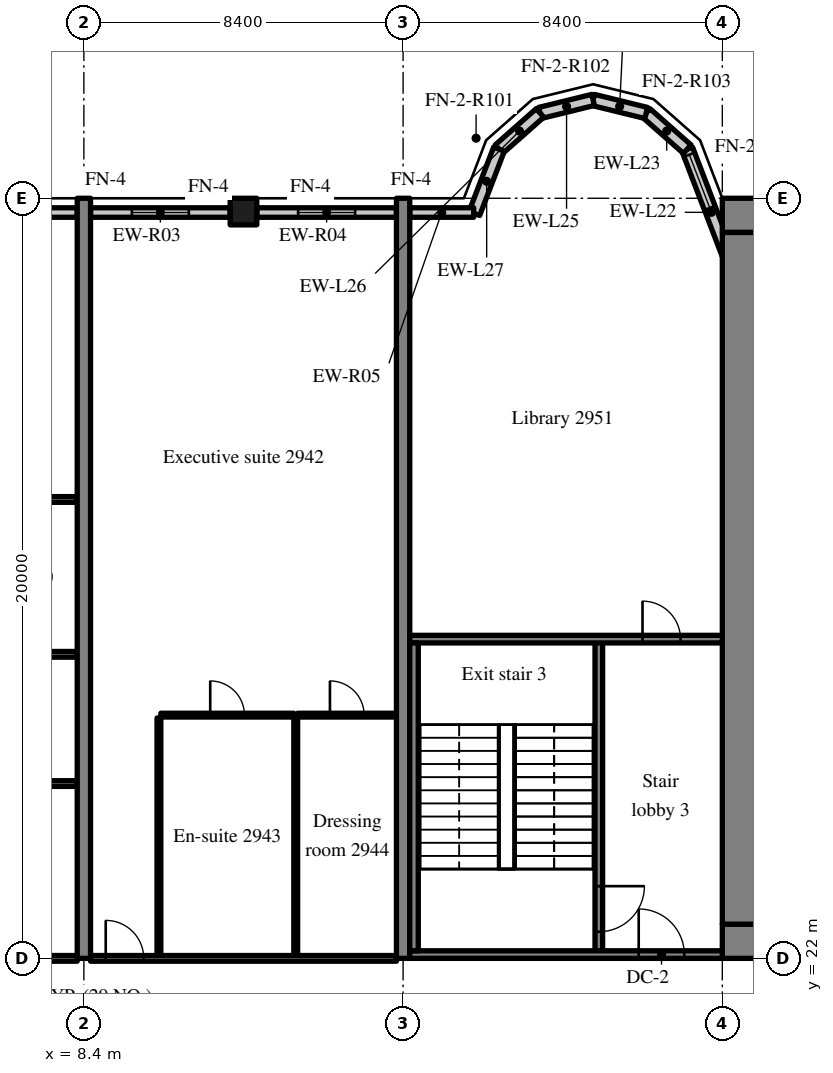
"""IFC4 building model, lengths in metres.
Left out: names, types, materials, properties, quantities, classifications, styles, units other than length and angle.
Written with IfcOpenShell. Run it as: python <this file> out.ifc"""

import sys

from ifc_helpers import new_model, si_unit, direction, frame, frame_2d, origin, origin_2d, place, context, subcontext, project, spatial, rectangle, extrude, source, transform, mapped, element, fill, save


model = new_model("IFC4")
c1 = context("Model", 3, precision=1e-05, world=origin(), true_north=direction((0.0, 1.0)))
c2 = subcontext(c1, "Body", "Model", "MODEL_VIEW")
j1 = project(units=[si_unit("LENGTHUNIT", "METRE"), si_unit("PLANEANGLEUNIT", "RADIAN")], contexts=[c1])
p1 = place(None, origin())
s1 = spatial("IfcSite", under=j1, at=p1, CompositionType="ELEMENT")
p2 = place(p1, origin())
s2 = spatial("IfcBuilding", under=s1, at=p2, CompositionType="ELEMENT")
p3 = place(p2, frame((0.0, 0.0, 121.8)))
s3 = spatial("IfcBuildingStorey", under=s2, at=p3, CompositionType="ELEMENT", Elevation=121.8)
m1 = source(origin(), c2, "Body", "SweptSolid", [
    extrude(rectangle(XDim=50.4, YDim=0.9, at=frame_2d((25.2, 0.0))), origin(), (0.0, 0.0, 1.0), 3.52),
])
p4 = place(p3, frame((25.2, 22.45, 0.0), z_axis=(0.0, 0.0, 1.0), x_axis=(1.0, 0.0, 0.0)))
e1 = element("IfcWall", 1, at=p4, inside=s3, PredefinedType="SHEAR", context=c2, shape_type="MappedRepresentation", body=[
    mapped(m1, transform((0.0, 0.0, 0.0), scale=1.0)),
])
m2 = source(origin(), c2, "Body", "SweptSolid", [
    extrude(rectangle(XDim=1.8, YDim=2.1, at=frame_2d((0.9, 1.05))), frame((0.0, 0.46, 0.0), z_axis=(0.0, -1.0, 0.0), x_axis=(1.0, 0.0, 0.0)), (0.0, 0.0, 1.0), 0.92),
])
p5 = place(p4, frame((15.9, 0.0, 0.0)))
e2 = element("IfcOpeningElement", 2, at=p5, cuts=e1, PredefinedType="OPENING", context=c2, shape_type="MappedRepresentation", body=[
    mapped(m2, transform((0.0, 0.0, 0.0), scale=1.0)),
])
m3 = source(origin(), c2, "Body", "SweptSolid", [
    extrude(rectangle(XDim=1.2, YDim=2.1, at=frame_2d((0.6, 1.05))), frame((0.0, 0.46, 0.0), z_axis=(0.0, -1.0, 0.0), x_axis=(1.0, 0.0, 0.0)), (0.0, 0.0, 1.0), 0.92),
])
p6 = place(p4, frame((26.975, 0.0, 0.0)))
e3 = element("IfcOpeningElement", 3, at=p6, cuts=e1, PredefinedType="OPENING", context=c2, shape_type="MappedRepresentation", body=[
    mapped(m3, transform((0.0, 0.0, 0.0), scale=1.0)),
])
m4 = source(origin(), c2, "Body", "SweptSolid", [
    extrude(rectangle(XDim=0.9, YDim=2.1, at=frame_2d((0.45, 1.05))), frame((0.0, 0.46, 0.0), z_axis=(0.0, -1.0, 0.0), x_axis=(1.0, 0.0, 0.0)), (0.0, 0.0, 1.0), 0.92),
])
p7 = place(p4, frame((33.75, 0.0, 0.0)))
e4 = element("IfcOpeningElement", 4, at=p7, cuts=e1, PredefinedType="OPENING", context=c2, shape_type="MappedRepresentation", body=[
    mapped(m4, transform((0.0, 0.0, 0.0), scale=1.0)),
])
p8 = place(p4, frame((30.75, 0.0, 0.0)))
e5 = element("IfcOpeningElement", 5, at=p8, cuts=e1, PredefinedType="OPENING", context=c2, shape_type="MappedRepresentation", body=[
    mapped(m4, transform((0.0, 0.0, 0.0), scale=1.0)),
])
p9 = place(p4, frame((38.275, 0.0, 0.0)))
e6 = element("IfcOpeningElement", 6, at=p9, cuts=e1, PredefinedType="OPENING", context=c2, shape_type="MappedRepresentation", body=[
    mapped(m4, transform((0.0, 0.0, 0.0), scale=1.0)),
])
p10 = place(p4, frame((6.45, 0.0, 0.0)))
e7 = element("IfcOpeningElement", 7, at=p10, cuts=e1, PredefinedType="OPENING", context=c2, shape_type="MappedRepresentation", body=[
    mapped(m3, transform((0.0, 0.0, 0.0), scale=1.0)),
])
p11 = place(p4, frame((47.775, 0.0, 0.0)))
e8 = element("IfcOpeningElement", 8, at=p11, cuts=e1, PredefinedType="OPENING", context=c2, shape_type="MappedRepresentation", body=[
    mapped(m3, transform((0.0, 0.0, 0.0), scale=1.0)),
])
p12 = place(p3, frame((25.2, 41.55, 0.0), z_axis=(0.0, 0.0, 1.0), x_axis=(1.0, 0.0, 0.0)))
e9 = element("IfcWall", 9, at=p12, inside=s3, PredefinedType="SHEAR", context=c2, shape_type="MappedRepresentation", body=[
    mapped(m1, transform((0.0, 0.0, 0.0), scale=1.0)),
])
m5 = source(origin(), c2, "Body", "SweptSolid", [
    extrude(rectangle(XDim=18.2, YDim=0.9, at=frame_2d((9.1, 0.0))), origin(), (0.0, 0.0, 1.0), 3.52),
])
p13 = place(p3, frame((25.65, 22.9, 0.0), z_axis=(0.0, 0.0, 1.0), x_axis=(0.0, 1.0, 0.0)))
e10 = element("IfcWall", 10, at=p13, inside=s3, PredefinedType="SHEAR", context=c2, shape_type="MappedRepresentation", body=[
    mapped(m5, transform((0.0, 0.0, 0.0), scale=1.0)),
])
m6 = source(origin(), c2, "Body", "SweptSolid", [
    extrude(rectangle(XDim=20.0, YDim=0.35, at=frame_2d((10.0, 0.0))), origin(), (0.0, 0.0, 1.0), 3.52),
])
for number, where, z_axis, x_axis in (
    (11, (8.4, 22.0, 0.0), (0.0, 0.0, 1.0), (0.0, 1.0, 0.0)),
    (12, (16.8, 22.0, 0.0), (0.0, 0.0, 1.0), (0.0, 1.0, 0.0)),
):
    element("IfcWall", number, at=place(p3, frame(where, z_axis=z_axis, x_axis=x_axis)), inside=s3, PredefinedType="SHEAR", context=c2, shape_type="MappedRepresentation", body=[
        mapped(m6, transform((0.0, 0.0, 0.0), scale=1.0)),
    ])
m7 = source(origin(), c2, "Body", "SweptSolid", [
    extrude(rectangle(XDim=0.7, YDim=0.7, at=origin_2d()), origin(), (0.0, 0.0, 1.0), 3.52),
])
p14 = place(p3, frame((12.6, 41.65, 0.0), z_axis=(0.0, 0.0, 1.0), x_axis=(1.0, 0.0, 0.0)))
e13 = element("IfcColumn", 13, at=p14, inside=s3, PredefinedType="COLUMN", context=c2, shape_type="MappedRepresentation", body=[
    mapped(m7, transform((0.0, 0.0, 0.0), scale=1.0)),
])
m8 = source(origin(), c2, "Body", "SweptSolid", [
    extrude(rectangle(XDim=3.559, YDim=0.3, at=frame_2d((1.78, 0.0))), origin(), (0.0, 0.0, 1.0), 3.52),
])
p15 = place(p3, frame((25.55, 39.969, 0.0), z_axis=(0.0, 0.0, 1.0), x_axis=(-0.35779745313, 0.933799219604, 0.0)))
e14 = element("IfcWall", 14, at=p15, inside=s3, PredefinedType="SOLIDWALL", context=c2, shape_type="MappedRepresentation", body=[
    mapped(m8, transform((0.0, 0.0, 0.0), scale=1.0)),
])
m9 = source(origin(), c2, "Body", "SweptSolid", [
    extrude(rectangle(XDim=1.5, YDim=2.0, at=frame_2d((0.75, 1.0))), frame((0.0, 0.16, 0.0), z_axis=(0.0, -1.0, 0.0), x_axis=(1.0, 0.0, 0.0)), (0.0, 0.0, 1.0), 0.32),
])
p16 = place(p15, frame((1.903, 0.0, 0.9)))
e15 = element("IfcOpeningElement", 15, at=p16, cuts=e14, PredefinedType="OPENING", context=c2, shape_type="MappedRepresentation", body=[
    mapped(m9, transform((0.0, 0.0, 0.0), scale=1.0)),
])
m10 = source(origin(), c2, "Body", "SweptSolid", [
    extrude(rectangle(XDim=1.44, YDim=0.3, at=frame_2d((0.72, 0.0))), origin(), (0.0, 0.0, 1.0), 3.52),
])
p17 = place(p3, frame((24.277, 43.292, 0.0), z_axis=(0.0, 0.0, 1.0), x_axis=(-0.749649827867, 0.661834673902, 0.0)))
e16 = element("IfcWall", 16, at=p17, inside=s3, PredefinedType="SOLIDWALL", context=c2, shape_type="MappedRepresentation", body=[
    mapped(m10, transform((0.0, 0.0, 0.0), scale=1.0)),
])
m11 = source(origin(), c2, "Body", "SweptSolid", [
    extrude(rectangle(XDim=1.438, YDim=0.3, at=frame_2d((0.719, 0.0))), origin(), (0.0, 0.0, 1.0), 3.52),
])
p18 = place(p3, frame((23.197, 44.245, 0.0), z_axis=(0.0, 0.0, 1.0), x_axis=(-0.971152283879, 0.238460146601, 0.0)))
e17 = element("IfcWall", 17, at=p18, inside=s3, PredefinedType="SOLIDWALL", context=c2, shape_type="MappedRepresentation", body=[
    mapped(m11, transform((0.0, 0.0, 0.0), scale=1.0)),
])
m12 = source(origin(), c2, "Body", "SweptSolid", [
    extrude(rectangle(XDim=1.439, YDim=0.3, at=frame_2d((0.719, 0.0))), origin(), (0.0, 0.0, 1.0), 3.52),
])
p19 = place(p3, frame((21.8, 44.588, 0.0), z_axis=(0.0, 0.0, 1.0), x_axis=(-0.971161932466, -0.238420848351, 0.0)))
e18 = element("IfcWall", 18, at=p19, inside=s3, PredefinedType="SOLIDWALL", context=c2, shape_type="MappedRepresentation", body=[
    mapped(m12, transform((0.0, 0.0, 0.0), scale=1.0)),
])
m13 = source(origin(), c2, "Body", "SweptSolid", [
    extrude(rectangle(XDim=1.44, YDim=0.3, at=frame_2d((0.72, 0.0))), origin(), (0.0, 0.0, 1.0), 3.52),
])
p20 = place(p3, frame((20.403, 44.245, 0.0), z_axis=(0.0, 0.0, 1.0), x_axis=(-0.74957555648, -0.661918790432, 0.0)))
e19 = element("IfcWall", 19, at=p20, inside=s3, PredefinedType="SOLIDWALL", context=c2, shape_type="MappedRepresentation", body=[
    mapped(m13, transform((0.0, 0.0, 0.0), scale=1.0)),
])
m14 = source(origin(), c2, "Body", "SweptSolid", [
    extrude(rectangle(XDim=1.812, YDim=0.3, at=frame_2d((0.906, 0.0))), origin(), (0.0, 0.0, 1.0), 3.52),
])
p21 = place(p3, frame((19.323, 43.292, 0.0), z_axis=(0.0, 0.0, 1.0), x_axis=(-0.357877270961, -0.93376863244, 0.0)))
e20 = element("IfcWall", 20, at=p21, inside=s3, PredefinedType="SOLIDWALL", context=c2, shape_type="MappedRepresentation", body=[
    mapped(m14, transform((0.0, 0.0, 0.0), scale=1.0)),
])
m15 = source(origin(), c2, "Body", "SweptSolid", [
    extrude(rectangle(XDim=4.07, YDim=0.25, at=frame_2d((2.035, 0.0))), origin(), (0.0, 0.0, 1.0), 2.82),
])
p22 = place(p3, frame((8.225, 41.625, 0.0), z_axis=(0.0, 0.0, 1.0), x_axis=(-1.0, 0.0, 0.0)))
e21 = element("IfcWall", 21, at=p22, inside=s3, PredefinedType="SOLIDWALL", context=c2, shape_type="MappedRepresentation", body=[
    mapped(m15, transform((0.0, 0.0, 0.0), scale=1.0)),
])
m16 = source(origin(), c2, "Body", "SweptSolid", [
    extrude(rectangle(XDim=1.5, YDim=1.5, at=frame_2d((0.75, 0.75))), frame((0.0, 0.135, 0.0), z_axis=(0.0, -1.0, 0.0), x_axis=(1.0, 0.0, 0.0)), (0.0, 0.0, 1.0), 0.27),
])
p23 = place(p22, frame((1.285, 0.0, 0.9)))
e22 = element("IfcOpeningElement", 22, at=p23, cuts=e21, PredefinedType="OPENING", context=c2, shape_type="MappedRepresentation", body=[
    mapped(m16, transform((0.0, 0.0, 0.0), scale=1.0)),
])
m17 = source(origin(), c2, "Body", "SweptSolid", [
    extrude(rectangle(XDim=3.675, YDim=0.25, at=frame_2d((1.837, 0.0))), origin(), (0.0, 0.0, 1.0), 2.82),
])
p24 = place(p3, frame((12.25, 41.625, 0.0), z_axis=(0.0, 0.0, 1.0), x_axis=(-1.0, 0.0, 0.0)))
e23 = element("IfcWall", 23, at=p24, inside=s3, PredefinedType="SOLIDWALL", context=c2, shape_type="MappedRepresentation", body=[
    mapped(m17, transform((0.0, 0.0, 0.0), scale=1.0)),
])
p25 = place(p24, frame((1.087, 0.0, 0.9)))
e24 = element("IfcOpeningElement", 24, at=p25, cuts=e23, PredefinedType="OPENING", context=c2, shape_type="MappedRepresentation", body=[
    mapped(m16, transform((0.0, 0.0, 0.0), scale=1.0)),
])
p26 = place(p3, frame((16.625, 41.625, 0.0), z_axis=(0.0, 0.0, 1.0), x_axis=(-1.0, 0.0, 0.0)))
e25 = element("IfcWall", 25, at=p26, inside=s3, PredefinedType="SOLIDWALL", context=c2, shape_type="MappedRepresentation", body=[
    mapped(m17, transform((0.0, 0.0, 0.0), scale=1.0)),
])
p27 = place(p26, frame((1.087, 0.0, 0.9)))
e26 = element("IfcOpeningElement", 26, at=p27, cuts=e25, PredefinedType="OPENING", context=c2, shape_type="MappedRepresentation", body=[
    mapped(m16, transform((0.0, 0.0, 0.0), scale=1.0)),
])
m18 = source(origin(), c2, "Body", "SweptSolid", [
    extrude(rectangle(XDim=1.683, YDim=0.25, at=frame_2d((0.841, 0.0))), origin(), (0.0, 0.0, 1.0), 2.82),
])
p28 = place(p3, frame((18.658, 41.625, 0.0), z_axis=(0.0, 0.0, 1.0), x_axis=(-1.0, 0.0, 0.0)))
e27 = element("IfcWall", 27, at=p28, inside=s3, PredefinedType="SOLIDWALL", context=c2, shape_type="MappedRepresentation", body=[
    mapped(m18, transform((0.0, 0.0, 0.0), scale=1.0)),
])
m19 = source(origin(), c2, "Body", "SweptSolid", [
    extrude(rectangle(XDim=8.3, YDim=0.2, at=frame_2d((4.15, 0.0))), origin(), (0.0, 0.0, 1.0), 3.52),
])
p29 = place(p3, frame((21.95, 22.1, 0.0), z_axis=(0.0, 0.0, 1.0), x_axis=(0.0, 1.0, 0.0)))
e28 = element("IfcWall", 28, at=p29, inside=s3, PredefinedType="SOLIDWALL", context=c2, shape_type="MappedRepresentation", body=[
    mapped(m19, transform((0.0, 0.0, 0.0), scale=1.0)),
])
m20 = source(origin(), c2, "Body", "SweptSolid", [
    extrude(rectangle(XDim=1.2, YDim=2.1, at=frame_2d((0.6, 1.05))), frame((0.0, 0.11, 0.0), z_axis=(0.0, -1.0, 0.0), x_axis=(1.0, 0.0, 0.0)), (0.0, 0.0, 1.0), 0.22),
])
p30 = place(p29, frame((0.6, 0.0, 0.0)))
e29 = element("IfcOpeningElement", 29, at=p30, cuts=e28, PredefinedType="OPENING", context=c2, shape_type="MappedRepresentation", body=[
    mapped(m20, transform((0.0, 0.0, 0.0), scale=1.0)),
])
m21 = source(origin(), c2, "Body", "SweptSolid", [
    extrude(rectangle(XDim=8.225, YDim=0.2, at=frame_2d((4.112, 0.0))), origin(), (0.0, 0.0, 1.0), 3.52),
])
p31 = place(p3, frame((16.975, 22.1, 0.0), z_axis=(0.0, 0.0, 1.0), x_axis=(1.0, 0.0, 0.0)))
e30 = element("IfcWall", 30, at=p31, inside=s3, PredefinedType="SOLIDWALL", context=c2, shape_type="MappedRepresentation", body=[
    mapped(m21, transform((0.0, 0.0, 0.0), scale=1.0)),
])
p32 = place(p31, frame((6.025, 0.0, 0.0)))
e31 = element("IfcOpeningElement", 31, at=p32, cuts=e30, PredefinedType="OPENING", context=c2, shape_type="MappedRepresentation", body=[
    mapped(m20, transform((0.0, 0.0, 0.0), scale=1.0)),
])
p33 = place(p3, frame((16.975, 30.4, 0.0), z_axis=(0.0, 0.0, 1.0), x_axis=(1.0, 0.0, 0.0)))
e32 = element("IfcWall", 32, at=p33, inside=s3, PredefinedType="SOLIDWALL", context=c2, shape_type="MappedRepresentation", body=[
    mapped(m21, transform((0.0, 0.0, 0.0), scale=1.0)),
])
m22 = source(origin(), c2, "Body", "SweptSolid", [
    extrude(rectangle(XDim=1.0, YDim=2.1, at=frame_2d((0.5, 1.05))), frame((0.0, 0.11, 0.0), z_axis=(0.0, -1.0, 0.0), x_axis=(1.0, 0.0, 0.0)), (0.0, 0.0, 1.0), 0.22),
])
p34 = place(p33, frame((6.125, 0.0, 0.0)))
e33 = element("IfcOpeningElement", 33, at=p34, cuts=e32, PredefinedType="OPENING", context=c2, shape_type="MappedRepresentation", body=[
    mapped(m22, transform((0.0, 0.0, 0.0), scale=1.0)),
])
m23 = source(origin(), c2, "Body", "SweptSolid", [
    extrude(rectangle(XDim=8.1, YDim=0.225, at=frame_2d((4.05, 0.0))), origin(), (0.0, 0.0, 1.0), 3.52),
])
p35 = place(p3, frame((17.087, 22.2, 0.0), z_axis=(0.0, 0.0, 1.0), x_axis=(0.0, 1.0, 0.0)))
e34 = element("IfcWall", 34, at=p35, inside=s3, PredefinedType="SOLIDWALL", context=c2, shape_type="MappedRepresentation", body=[
    mapped(m23, transform((0.0, 0.0, 0.0), scale=1.0)),
])
m24 = source(origin(), c2, "Body", "SweptSolid", [
    extrude(rectangle(XDim=5.325, YDim=0.15, at=frame_2d((2.663, 0.0))), origin(), (0.0, 0.0, 1.0), 2.82),
])
p36 = place(p3, frame((2.9, 22.0, 0.0), z_axis=(0.0, 0.0, 1.0), x_axis=(1.0, 0.0, 0.0)))
e35 = element("IfcWall", 35, at=p36, inside=s3, PredefinedType="PARTITIONING", context=c2, shape_type="MappedRepresentation", body=[
    mapped(m24, transform((0.0, 0.0, 0.0), scale=1.0)),
])
m25 = source(origin(), c2, "Body", "SweptSolid", [
    extrude(rectangle(XDim=5.325, YDim=0.15, at=frame_2d((2.663, 0.0))), origin(), (0.0, 0.0, 1.0), 3.52),
])
for number, where, z_axis, x_axis in (
    (36, (2.9, 26.6, 0.0), (0.0, 0.0, 1.0), (1.0, 0.0, 0.0)),
    (37, (2.9, 30.0, 0.0), (0.0, 0.0, 1.0), (1.0, 0.0, 0.0)),
):
    element("IfcWall", number, at=place(p3, frame(where, z_axis=z_axis, x_axis=x_axis)), inside=s3, PredefinedType="PARTITIONING", context=c2, shape_type="MappedRepresentation", body=[
        mapped(m25, transform((0.0, 0.0, 0.0), scale=1.0)),
    ])
m26 = source(origin(), c2, "Body", "SweptSolid", [
    extrude(rectangle(XDim=7.875, YDim=0.15, at=frame_2d((3.938, 0.0))), origin(), (0.0, 0.0, 1.0), 3.52),
])
p37 = place(p3, frame((0.35, 34.075, 0.0), z_axis=(0.0, 0.0, 1.0), x_axis=(1.0, 0.0, 0.0)))
e38 = element("IfcWall", 38, at=p37, inside=s3, PredefinedType="PARTITIONING", context=c2, shape_type="MappedRepresentation", body=[
    mapped(m26, transform((0.0, 0.0, 0.0), scale=1.0)),
])
m27 = source(origin(), c2, "Body", "SweptSolid", [
    extrude(rectangle(XDim=1.0, YDim=2.1, at=frame_2d((0.5, 1.05))), frame((0.0, 0.085, 0.0), z_axis=(0.0, -1.0, 0.0), x_axis=(1.0, 0.0, 0.0)), (0.0, 0.0, 1.0), 0.17),
])
p38 = place(p37, frame((0.7, 0.0, 0.0)))
e39 = element("IfcOpeningElement", 39, at=p38, cuts=e38, PredefinedType="OPENING", context=c2, shape_type="MappedRepresentation", body=[
    mapped(m27, transform((0.0, 0.0, 0.0), scale=1.0)),
])
m28 = source(origin(), c2, "Body", "SweptSolid", [
    extrude(rectangle(XDim=6.25, YDim=0.1, at=frame_2d((3.125, 0.0))), origin(), (0.0, 0.0, 1.0), 3.52),
])
for number, where, z_axis, x_axis in (
    (40, (10.375, 22.075, 0.0), (0.0, 0.0, 1.0), (0.0, 1.0, 0.0)),
    (41, (13.975, 22.075, 0.0), (0.0, 0.0, 1.0), (0.0, 1.0, 0.0)),
):
    element("IfcWall", number, at=place(p3, frame(where, z_axis=z_axis, x_axis=x_axis)), inside=s3, PredefinedType="PARTITIONING", context=c2, shape_type="MappedRepresentation", body=[
        mapped(m28, transform((0.0, 0.0, 0.0), scale=1.0)),
    ])
m29 = source(origin(), c2, "Body", "SweptSolid", [
    extrude(rectangle(XDim=3.5, YDim=0.1, at=frame_2d((1.75, 0.0))), origin(), (0.0, 0.0, 1.0), 3.52),
])
p39 = place(p3, frame((10.425, 28.4, 0.0), z_axis=(0.0, 0.0, 1.0), x_axis=(1.0, 0.0, 0.0)))
e42 = element("IfcWall", 42, at=p39, inside=s3, PredefinedType="PARTITIONING", context=c2, shape_type="MappedRepresentation", body=[
    mapped(m29, transform((0.0, 0.0, 0.0), scale=1.0)),
])
m30 = source(origin(), c2, "Body", "SweptSolid", [
    extrude(rectangle(XDim=0.9, YDim=2.1, at=frame_2d((0.45, 1.05))), frame((0.0, 0.06, 0.0), z_axis=(0.0, -1.0, 0.0), x_axis=(1.0, 0.0, 0.0)), (0.0, 0.0, 1.0), 0.12),
])
p40 = place(p39, frame((1.3, 0.0, 0.0)))
e43 = element("IfcOpeningElement", 43, at=p40, cuts=e42, PredefinedType="OPENING", context=c2, shape_type="MappedRepresentation", body=[
    mapped(m30, transform((0.0, 0.0, 0.0), scale=1.0)),
])
m31 = source(origin(), c2, "Body", "SweptSolid", [
    extrude(rectangle(XDim=2.6, YDim=0.1, at=frame_2d((1.3, 0.0))), origin(), (0.0, 0.0, 1.0), 3.52),
])
p41 = place(p3, frame((14.025, 28.4, 0.0), z_axis=(0.0, 0.0, 1.0), x_axis=(1.0, 0.0, 0.0)))
e44 = element("IfcWall", 44, at=p41, inside=s3, PredefinedType="PARTITIONING", context=c2, shape_type="MappedRepresentation", body=[
    mapped(m31, transform((0.0, 0.0, 0.0), scale=1.0)),
])
p42 = place(p41, frame((0.85, 0.0, 0.0)))
e45 = element("IfcOpeningElement", 45, at=p42, cuts=e44, PredefinedType="OPENING", context=c2, shape_type="MappedRepresentation", body=[
    mapped(m30, transform((0.0, 0.0, 0.0), scale=1.0)),
])
m32 = source(origin(), c2, "Body", "SweptSolid", [
    extrude(rectangle(XDim=8.05, YDim=0.15, at=frame_2d((4.025, 0.0))), origin(), (0.0, 0.0, 1.0), 2.82),
])
p43 = place(p3, frame((8.575, 22.0, 0.0), z_axis=(0.0, 0.0, 1.0), x_axis=(1.0, 0.0, 0.0)))
e46 = element("IfcWall", 46, at=p43, inside=s3, PredefinedType="PARTITIONING", context=c2, shape_type="MappedRepresentation", body=[
    mapped(m32, transform((0.0, 0.0, 0.0), scale=1.0)),
])
p44 = place(p43, frame((0.4, 0.0, 0.0)))
e47 = element("IfcOpeningElement", 47, at=p44, cuts=e46, PredefinedType="OPENING", context=c2, shape_type="MappedRepresentation", body=[
    mapped(m27, transform((0.0, 0.0, 0.0), scale=1.0)),
])
m33 = source(origin(), c2, "Body", "SweptSolid", [
    extrude(rectangle(XDim=1.5, YDim=2.0, at=frame_2d((0.75, 1.0))), frame((0.0, 0.03, 0.0), z_axis=(0.0, -1.0, 0.0), x_axis=(1.0, 0.0, 0.0)), (0.0, 0.0, 1.0), 0.06),
])
p45 = place(p16, origin())
e48 = element("IfcWindow", 48, at=p45, inside=s3, PartitioningType="SINGLE_PANEL", PredefinedType="WINDOW", context=c2, shape_type="MappedRepresentation", body=[
    mapped(m33, transform((0.0, 0.0, 0.0), scale=1.0)),
])
fill(e15, e48)
m34 = source(origin(), c2, "Body", "SweptSolid", [
    extrude(rectangle(XDim=1.5, YDim=1.5, at=frame_2d((0.75, 0.75))), frame((0.0, 0.03, 0.0), z_axis=(0.0, -1.0, 0.0), x_axis=(1.0, 0.0, 0.0)), (0.0, 0.0, 1.0), 0.06),
])
p46 = place(p25, origin())
e49 = element("IfcWindow", 49, at=p46, inside=s3, PartitioningType="SINGLE_PANEL", PredefinedType="WINDOW", context=c2, shape_type="MappedRepresentation", body=[
    mapped(m34, transform((0.0, 0.0, 0.0), scale=1.0)),
])
fill(e24, e49)
p47 = place(p27, origin())
e50 = element("IfcWindow", 50, at=p47, inside=s3, PartitioningType="SINGLE_PANEL", PredefinedType="WINDOW", context=c2, shape_type="MappedRepresentation", body=[
    mapped(m34, transform((0.0, 0.0, 0.0), scale=1.0)),
])
fill(e26, e50)
m35 = source(origin(), c2, "Body", "SweptSolid", [
    extrude(rectangle(XDim=1.2, YDim=2.1, at=frame_2d((0.6, 1.05))), frame((0.0, 0.025, 0.0), z_axis=(0.0, -1.0, 0.0), x_axis=(1.0, 0.0, 0.0)), (0.0, 0.0, 1.0), 0.05),
])
p48 = place(p30, origin())
e51 = element("IfcDoor", 51, at=p48, inside=s3, OperationType="SINGLE_SWING_RIGHT", PredefinedType="DOOR", context=c2, shape_type="MappedRepresentation", body=[
    mapped(m35, transform((0.0, 0.0, 0.0), scale=1.0)),
])
fill(e29, e51)
p49 = place(p32, origin())
e52 = element("IfcDoor", 52, at=p49, inside=s3, OperationType="SINGLE_SWING_LEFT", PredefinedType="DOOR", context=c2, shape_type="MappedRepresentation", body=[
    mapped(m35, transform((0.0, 0.0, 0.0), scale=1.0)),
])
fill(e31, e52)
m36 = source(origin(), c2, "Body", "SweptSolid", [
    extrude(rectangle(XDim=1.0, YDim=2.1, at=frame_2d((0.5, 1.05))), frame((0.0, 0.025, 0.0), z_axis=(0.0, -1.0, 0.0), x_axis=(1.0, 0.0, 0.0)), (0.0, 0.0, 1.0), 0.05),
])
p50 = place(p34, origin())
e53 = element("IfcDoor", 53, at=p50, inside=s3, OperationType="SINGLE_SWING_LEFT", PredefinedType="DOOR", context=c2, shape_type="MappedRepresentation", body=[
    mapped(m36, transform((0.0, 0.0, 0.0), scale=1.0)),
])
fill(e33, e53)
m37 = source(origin(), c2, "Body", "SweptSolid", [
    extrude(rectangle(XDim=0.9, YDim=2.1, at=frame_2d((0.45, 1.05))), frame((0.0, 0.025, 0.0), z_axis=(0.0, -1.0, 0.0), x_axis=(1.0, 0.0, 0.0)), (0.0, 0.0, 1.0), 0.05),
])
p51 = place(p40, origin())
e54 = element("IfcDoor", 54, at=p51, inside=s3, OperationType="SINGLE_SWING_LEFT", PredefinedType="DOOR", context=c2, shape_type="MappedRepresentation", body=[
    mapped(m37, transform((0.0, 0.0, 0.0), scale=1.0)),
])
fill(e43, e54)
p52 = place(p42, origin())
e55 = element("IfcDoor", 55, at=p52, inside=s3, OperationType="SINGLE_SWING_LEFT", PredefinedType="DOOR", context=c2, shape_type="MappedRepresentation", body=[
    mapped(m37, transform((0.0, 0.0, 0.0), scale=1.0)),
])
fill(e45, e55)
p53 = place(p44, origin())
e56 = element("IfcDoor", 56, at=p53, inside=s3, OperationType="SINGLE_SWING_LEFT", PredefinedType="DOOR", context=c2, shape_type="MappedRepresentation", body=[
    mapped(m36, transform((0.0, 0.0, 0.0), scale=1.0)),
])
fill(e47, e56)
save(model, sys.argv[1])
